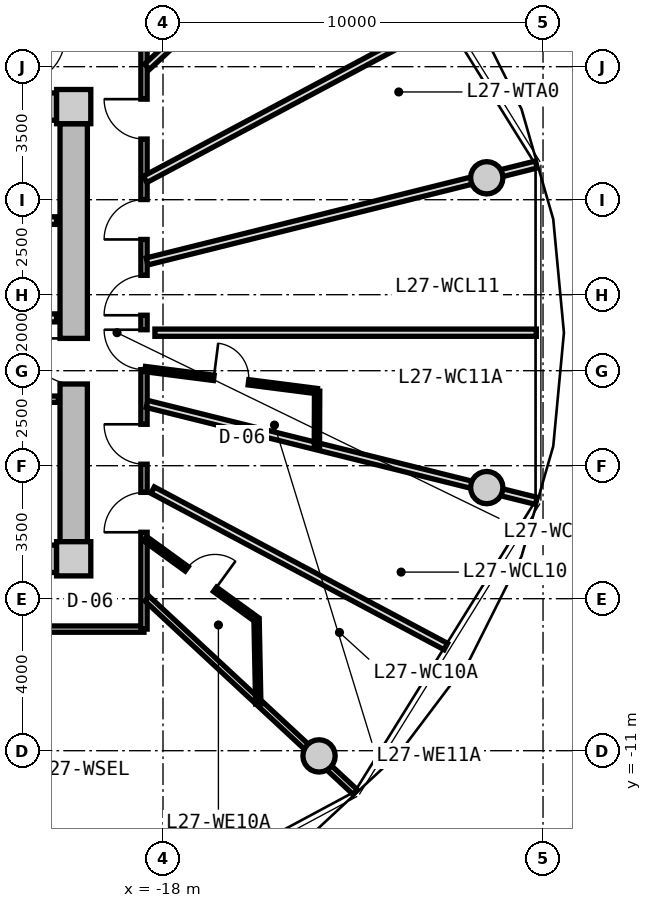
"""IFC4 building model, lengths in metres.
Left out: names, types, materials, properties, quantities, classifications, styles, units other than length and angle.
Written with IfcOpenShell. Run it as: python <this file> out.ifc"""

import sys

from ifc_helpers import new_model, si_unit, direction, frame, frame_2d, origin, origin_2d, place, context, subcontext, project, spatial, rectangle, circle, extrude, source, transform, mapped, element, fill, save


model = new_model("IFC4")
c1 = context("Model", 3, precision=1e-05, world=origin(), true_north=direction((0.0, 1.0)))
c2 = subcontext(c1, "Body", "Model", "MODEL_VIEW")
j1 = project(units=[si_unit("LENGTHUNIT", "METRE"), si_unit("PLANEANGLEUNIT", "RADIAN")], contexts=[c1])
p1 = place(None, origin())
s1 = spatial("IfcSite", under=j1, at=p1, CompositionType="ELEMENT")
p2 = place(p1, origin())
s2 = spatial("IfcBuilding", under=s1, at=p2, CompositionType="ELEMENT")
p3 = place(p2, frame((0.0, 0.0, 90.15)))
s3 = spatial("IfcBuildingStorey", under=s2, at=p3, CompositionType="ELEMENT", Elevation=90.15)
m1 = source(origin(), c2, "Body", "SweptSolid", [
    extrude(rectangle(XDim=0.9, YDim=0.9, at=origin_2d()), origin(), (0.0, 0.0, 1.0), 3.05),
])
for number, where, z_axis, x_axis in (
    (1, (-20.35, -5.95, 0.0), (0.0, 0.0, 1.0), (1.0, 0.0, 0.0)),
    (2, (-20.35, 5.95, 0.0), (0.0, 0.0, 1.0), (1.0, 0.0, 0.0)),
):
    element("IfcColumn", number, at=place(p3, frame(where, z_axis=z_axis, x_axis=x_axis)), inside=s3, PredefinedType="COLUMN", context=c2, shape_type="MappedRepresentation", body=[
        mapped(m1, transform((0.0, 0.0, 0.0), x_axis=(1.0, 0.0, 0.0), y_axis=(0.0, 1.0, 0.0), z_axis=(0.0, 0.0, 1.0), scale=1.0)),
    ])
m2 = source(origin(), c2, "Body", "SweptSolid", [
    extrude(rectangle(XDim=14.4, YDim=0.72, at=frame_2d((7.2, 0.0))), origin(), (0.0, 0.0, 1.0), 2.79),
])
for number, where, z_axis, x_axis in (
    (3, (-35.2, 5.95, 0.0), (0.0, 0.0, 1.0), (1.0, 0.0, 0.0)),
    (4, (-20.8, -5.95, 0.0), (0.0, 0.0, 1.0), (-1.0, 0.0, 0.0)),
):
    element("IfcWall", number, at=place(p3, frame(where, z_axis=z_axis, x_axis=x_axis)), inside=s3, PredefinedType="SHEAR", context=c2, shape_type="MappedRepresentation", body=[
        mapped(m2, transform((0.0, 0.0, 0.0), x_axis=(1.0, 0.0, 0.0), y_axis=(0.0, 1.0, 0.0), z_axis=(0.0, 0.0, 1.0), scale=1.0)),
    ])
m3 = source(origin(), c2, "Body", "SweptSolid", [
    extrude(rectangle(XDim=11.0, YDim=0.72, at=frame_2d((5.5, 0.0))), origin(), (0.0, 0.0, 1.0), 2.79),
])
p4 = place(p3, frame((-20.35, 5.5, 0.0), z_axis=(0.0, 0.0, 1.0), x_axis=(0.0, -1.0, 0.0)))
e5 = element("IfcWall", 5, at=p4, inside=s3, PredefinedType="SHEAR", context=c2, shape_type="MappedRepresentation", body=[
    mapped(m3, transform((0.0, 0.0, 0.0), x_axis=(1.0, 0.0, 0.0), y_axis=(0.0, 1.0, 0.0), z_axis=(0.0, 0.0, 1.0), scale=1.0)),
])
p5 = place(p4, frame((5.65, 0.0, 0.0)))
e6 = element("IfcOpeningElement", 6, at=p5, cuts=e5, PredefinedType="OPENING", context=c2, shape_type="SweptSolid", body=[
    extrude(rectangle(XDim=1.2, YDim=2.15, at=frame_2d((0.6, 1.075))), frame((0.0, 0.37, 0.0), z_axis=(0.0, -1.0, 0.0), x_axis=(1.0, 0.0, 0.0)), (0.0, 0.0, 1.0), 0.74),
])
m4 = source(origin(), c2, "Body", "SweptSolid", [
    extrude(circle(Radius=0.425, at=origin_2d()), origin(), (0.0, 0.0, 1.0), 3.05),
])
for number, where, z_axis, x_axis in (
    (7, (-9.481, 4.076, 0.0), (0.0, 0.0, 1.0), (1.0, 0.0, 0.0)),
    (8, (-13.894, -11.137, 0.0), (0.0, 0.0, 1.0), (1.0, 0.0, 0.0)),
    (9, (-9.481, -4.076, 0.0), (0.0, 0.0, 1.0), (1.0, 0.0, 0.0)),
):
    element("IfcColumn", number, at=place(p3, frame(where, z_axis=z_axis, x_axis=x_axis)), inside=s3, PredefinedType="COLUMN", context=c2, shape_type="MappedRepresentation", body=[
        mapped(m4, transform((0.0, 0.0, 0.0), x_axis=(1.0, 0.0, 0.0), y_axis=(0.0, 1.0, 0.0), z_axis=(0.0, 0.0, 1.0), scale=1.0)),
    ])
m5 = source(origin(), c2, "Body", "SweptSolid", [
    extrude(rectangle(XDim=3.2, YDim=0.2, at=frame_2d((1.6, 0.0))), origin(), (0.0, 0.0, 1.0), 2.775),
])
p6 = place(p3, frame((-24.0, 2.95, 0.0), z_axis=(0.0, 0.0, 1.0), x_axis=(1.0, 0.0, 0.0)))
e10 = element("IfcWall", 10, at=p6, inside=s3, PredefinedType="PARTITIONING", context=c2, shape_type="MappedRepresentation", body=[
    mapped(m5, transform((0.0, 0.0, 0.0), x_axis=(1.0, 0.0, 0.0), y_axis=(0.0, 1.0, 0.0), z_axis=(0.0, 0.0, 1.0), scale=1.0)),
])
m6 = source(origin(), c2, "Body", "SweptSolid", [
    extrude(rectangle(XDim=6.66, YDim=0.21, at=frame_2d((3.33, 0.0))), origin(), (0.0, 0.0, 1.0), 2.775),
])
p7 = place(p3, frame((-27.46, 0.39, 0.0), z_axis=(0.0, 0.0, 1.0), x_axis=(1.0, 0.0, 0.0)))
e11 = element("IfcWall", 11, at=p7, inside=s3, PredefinedType="PARTITIONING", context=c2, shape_type="MappedRepresentation", body=[
    mapped(m6, transform((0.0, 0.0, 0.0), x_axis=(1.0, 0.0, 0.0), y_axis=(0.0, 1.0, 0.0), z_axis=(0.0, 0.0, 1.0), scale=1.0)),
])
p8 = place(p7, frame((1.0, 0.0, 0.0)))
e12 = element("IfcOpeningElement", 12, at=p8, cuts=e11, PredefinedType="OPENING", context=c2, shape_type="SweptSolid", body=[
    extrude(rectangle(XDim=1.2, YDim=2.15, at=frame_2d((0.6, 1.075))), frame((0.0, 0.115, 0.0), z_axis=(0.0, -1.0, 0.0), x_axis=(1.0, 0.0, 0.0)), (0.0, 0.0, 1.0), 0.23),
])
m7 = source(origin(), c2, "Body", "SweptSolid", [
    extrude(rectangle(XDim=2.7, YDim=0.165, at=frame_2d((1.35, 0.0))), origin(), (0.0, 0.0, 1.0), 2.775),
])
p9 = place(p3, frame((-23.45, -1.75, 0.0), z_axis=(0.0, 0.0, 1.0), x_axis=(1.0, 0.0, 0.0)))
e13 = element("IfcWall", 13, at=p9, inside=s3, PredefinedType="PARTITIONING", context=c2, shape_type="MappedRepresentation", body=[
    mapped(m7, transform((0.0, 0.0, 0.0), x_axis=(1.0, 0.0, 0.0), y_axis=(0.0, 1.0, 0.0), z_axis=(0.0, 0.0, 1.0), scale=1.0)),
])
p10 = place(p9, frame((0.222, 0.0, 0.0)))
e14 = element("IfcOpeningElement", 14, at=p10, cuts=e13, PredefinedType="OPENING", context=c2, shape_type="SweptSolid", body=[
    extrude(rectangle(XDim=0.925, YDim=2.1, at=frame_2d((0.462, 1.05))), frame((0.0, 0.093, 0.0), z_axis=(0.0, -1.0, 0.0), x_axis=(1.0, 0.0, 0.0)), (0.0, 0.0, 1.0), 0.185),
])
p11 = place(p9, frame((1.522, 0.0, 0.0)))
e15 = element("IfcOpeningElement", 15, at=p11, cuts=e13, PredefinedType="OPENING", context=c2, shape_type="SweptSolid", body=[
    extrude(rectangle(XDim=0.925, YDim=2.1, at=frame_2d((0.462, 1.05))), frame((0.0, 0.093, 0.0), z_axis=(0.0, -1.0, 0.0), x_axis=(1.0, 0.0, 0.0)), (0.0, 0.0, 1.0), 0.185),
])
m8 = source(origin(), c2, "Body", "SweptSolid", [
    extrude(rectangle(XDim=8.6, YDim=0.165, at=frame_2d((4.3, 0.0))), origin(), (0.0, 0.0, 1.0), 2.775),
])
p12 = place(p3, frame((-18.5, -7.8, 0.0), z_axis=(0.0, 0.0, 1.0), x_axis=(-1.0, 0.0, 0.0)))
e16 = element("IfcWall", 16, at=p12, inside=s3, PredefinedType="PARTITIONING", context=c2, shape_type="MappedRepresentation", body=[
    mapped(m8, transform((0.0, 0.0, 0.0), x_axis=(1.0, 0.0, 0.0), y_axis=(0.0, 1.0, 0.0), z_axis=(0.0, 0.0, 1.0), scale=1.0)),
])
p13 = place(p12, frame((3.775, 0.0, 0.0)))
e17 = element("IfcOpeningElement", 17, at=p13, cuts=e16, PredefinedType="OPENING", context=c2, shape_type="SweptSolid", body=[
    extrude(rectangle(XDim=1.05, YDim=2.15, at=frame_2d((0.525, 1.075))), frame((0.0, 0.093, 0.0), z_axis=(0.0, -1.0, 0.0), x_axis=(1.0, 0.0, 0.0)), (0.0, 0.0, 1.0), 0.185),
])
m9 = source(origin(), c2, "Body", "SweptSolid", [
    extrude(rectangle(XDim=15.6, YDim=0.165, at=frame_2d((7.8, 0.0))), origin(), (0.0, 0.0, 1.0), 2.775),
])
p14 = place(p3, frame((-18.5, 7.8, 0.0), z_axis=(0.0, 0.0, 1.0), x_axis=(0.0, -1.0, 0.0)))
e18 = element("IfcWall", 18, at=p14, inside=s3, PredefinedType="PARTITIONING", context=c2, shape_type="MappedRepresentation", body=[
    mapped(m9, transform((0.0, 0.0, 0.0), x_axis=(1.0, 0.0, 0.0), y_axis=(0.0, 1.0, 0.0), z_axis=(0.0, 0.0, 1.0), scale=1.0)),
])
p15 = place(p14, frame((12.002, 0.0, 0.0)))
e19 = element("IfcOpeningElement", 19, at=p15, cuts=e18, PredefinedType="OPENING", context=c2, shape_type="SweptSolid", body=[
    extrude(rectangle(XDim=1.05, YDim=2.15, at=frame_2d((0.525, 1.075))), frame((0.0, 0.093, 0.0), z_axis=(0.0, -1.0, 0.0), x_axis=(1.0, 0.0, 0.0)), (0.0, 0.0, 1.0), 0.185),
])
p16 = place(p14, frame((10.211, 0.0, 0.0)))
e20 = element("IfcOpeningElement", 20, at=p16, cuts=e18, PredefinedType="OPENING", context=c2, shape_type="SweptSolid", body=[
    extrude(rectangle(XDim=1.05, YDim=2.15, at=frame_2d((0.525, 1.075))), frame((0.0, 0.093, 0.0), z_axis=(0.0, -1.0, 0.0), x_axis=(1.0, 0.0, 0.0)), (0.0, 0.0, 1.0), 0.185),
])
p17 = place(p14, frame((7.722, 0.0, 0.0)))
e21 = element("IfcOpeningElement", 21, at=p17, cuts=e18, PredefinedType="OPENING", context=c2, shape_type="SweptSolid", body=[
    extrude(rectangle(XDim=1.05, YDim=2.15, at=frame_2d((0.525, 1.075))), frame((0.0, 0.093, 0.0), z_axis=(0.0, -1.0, 0.0), x_axis=(1.0, 0.0, 0.0)), (0.0, 0.0, 1.0), 0.185),
])
p18 = place(p14, frame((6.291, 0.0, 0.0)))
e22 = element("IfcOpeningElement", 22, at=p18, cuts=e18, PredefinedType="OPENING", context=c2, shape_type="SweptSolid", body=[
    extrude(rectangle(XDim=1.05, YDim=2.15, at=frame_2d((0.525, 1.075))), frame((0.0, 0.093, 0.0), z_axis=(0.0, -1.0, 0.0), x_axis=(1.0, 0.0, 0.0)), (0.0, 0.0, 1.0), 0.185),
])
p19 = place(p14, frame((4.296, 0.0, 0.0)))
e23 = element("IfcOpeningElement", 23, at=p19, cuts=e18, PredefinedType="OPENING", context=c2, shape_type="SweptSolid", body=[
    extrude(rectangle(XDim=1.05, YDim=2.15, at=frame_2d((0.525, 1.075))), frame((0.0, 0.093, 0.0), z_axis=(0.0, -1.0, 0.0), x_axis=(1.0, 0.0, 0.0)), (0.0, 0.0, 1.0), 0.185),
])
p20 = place(p14, frame((1.654, 0.0, 0.0)))
e24 = element("IfcOpeningElement", 24, at=p20, cuts=e18, PredefinedType="OPENING", context=c2, shape_type="SweptSolid", body=[
    extrude(rectangle(XDim=1.05, YDim=2.15, at=frame_2d((0.525, 1.075))), frame((0.0, 0.093, 0.0), z_axis=(0.0, -1.0, 0.0), x_axis=(1.0, 0.0, 0.0)), (0.0, 0.0, 1.0), 0.185),
])
m10 = source(origin(), c2, "Body", "SweptSolid", [
    extrude(rectangle(XDim=7.482, YDim=0.165, at=frame_2d((3.741, 0.0))), origin(), (0.0, 0.0, 1.0), 2.275),
])
p21 = place(p3, frame((-18.42, -6.998, 0.0), z_axis=(0.0, 0.0, 1.0), x_axis=(0.732508698043, -0.680757671489, 0.0)))
e25 = element("IfcWall", 25, at=p21, inside=s3, PredefinedType="PARTITIONING", context=c2, shape_type="MappedRepresentation", body=[
    mapped(m10, transform((0.0, 0.0, 0.0), x_axis=(1.0, 0.0, 0.0), y_axis=(0.0, 1.0, 0.0), z_axis=(0.0, 0.0, 1.0), scale=1.0)),
])
m11 = source(origin(), c2, "Body", "SweptSolid", [
    extrude(rectangle(XDim=10.556, YDim=0.19, at=frame_2d((5.278, 0.0))), origin(), (0.0, 0.0, 1.0), 2.275),
])
p22 = place(p3, frame((-18.42, -1.875, 0.0), z_axis=(0.0, 0.0, 1.0), x_axis=(0.970363857851, -0.241648470667, 0.0)))
e26 = element("IfcWall", 26, at=p22, inside=s3, PredefinedType="PARTITIONING", context=c2, shape_type="MappedRepresentation", body=[
    mapped(m11, transform((0.0, 0.0, 0.0), x_axis=(1.0, 0.0, 0.0), y_axis=(0.0, 1.0, 0.0), z_axis=(0.0, 0.0, 1.0), scale=1.0)),
])
m12 = source(origin(), c2, "Body", "SweptSolid", [
    extrude(rectangle(XDim=8.744, YDim=0.19, at=frame_2d((4.372, 0.0))), origin(), (0.0, 0.0, 1.0), 2.775),
])
p23 = place(p3, frame((-18.273, -4.142, 0.0), z_axis=(0.0, 0.0, 1.0), x_axis=(0.882252449936, -0.470776607938, 0.0)))
e27 = element("IfcWall", 27, at=p23, inside=s3, PredefinedType="PARTITIONING", context=c2, shape_type="MappedRepresentation", body=[
    mapped(m12, transform((0.0, 0.0, 0.0), x_axis=(1.0, 0.0, 0.0), y_axis=(0.0, 1.0, 0.0), z_axis=(0.0, 0.0, 1.0), scale=1.0)),
])
m13 = source(origin(), c2, "Body", "SweptSolid", [
    extrude(rectangle(XDim=3.621, YDim=0.14, at=frame_2d((1.811, 0.0))), origin(), (0.0, 0.0, 1.0), 2.775),
])
p24 = place(p3, frame((-18.47, -5.422, 0.0), z_axis=(0.0, 0.0, 1.0), x_axis=(0.80968252222, -0.586868139544, 0.0)))
e28 = element("IfcWall", 28, at=p24, inside=s3, PredefinedType="PARTITIONING", context=c2, shape_type="MappedRepresentation", body=[
    mapped(m13, transform((0.0, 0.0, 0.0), x_axis=(1.0, 0.0, 0.0), y_axis=(0.0, 1.0, 0.0), z_axis=(0.0, 0.0, 1.0), scale=1.0)),
])
p25 = place(p24, frame((1.351, 0.0, 0.0)))
e29 = element("IfcOpeningElement", 29, at=p25, cuts=e28, PredefinedType="OPENING", context=c2, shape_type="SweptSolid", body=[
    extrude(rectangle(XDim=0.92, YDim=2.1, at=frame_2d((0.46, 1.05))), frame((0.0, 0.08, 0.0), z_axis=(0.0, -1.0, 0.0), x_axis=(1.0, 0.0, 0.0)), (0.0, 0.0, 1.0), 0.16),
])
m14 = source(origin(), c2, "Body", "SweptSolid", [
    extrude(rectangle(XDim=2.225, YDim=0.14, at=frame_2d((1.112, 0.0))), origin(), (0.0, 0.0, 1.0), 2.775),
])
p26 = place(p3, frame((-15.538, -7.547, 0.0), z_axis=(0.0, 0.0, 1.0), x_axis=(0.019971869027, -0.999800542332, 0.0)))
e30 = element("IfcWall", 30, at=p26, inside=s3, PredefinedType="PARTITIONING", context=c2, shape_type="MappedRepresentation", body=[
    mapped(m14, transform((0.0, 0.0, 0.0), x_axis=(1.0, 0.0, 0.0), y_axis=(0.0, 1.0, 0.0), z_axis=(0.0, 0.0, 1.0), scale=1.0)),
])
p27 = place(p3, frame((-18.42, 1.875, 0.0), z_axis=(0.0, 0.0, 1.0), x_axis=(0.970363857851, 0.241648470667, 0.0)))
e31 = element("IfcWall", 31, at=p27, inside=s3, PredefinedType="PARTITIONING", context=c2, shape_type="MappedRepresentation", body=[
    mapped(m11, transform((0.0, 0.0, 0.0), x_axis=(1.0, 0.0, 0.0), y_axis=(0.0, 1.0, 0.0), z_axis=(0.0, 0.0, 1.0), scale=1.0)),
])
m15 = source(origin(), c2, "Body", "SweptSolid", [
    extrude(rectangle(XDim=10.036, YDim=0.19, at=frame_2d((5.018, 0.0))), origin(), (0.0, 0.0, 1.0), 2.775),
])
p28 = place(p3, frame((-18.213, 0.0, 0.0), z_axis=(0.0, 0.0, 1.0), x_axis=(1.0, 0.0, 0.0)))
e32 = element("IfcWall", 32, at=p28, inside=s3, PredefinedType="PARTITIONING", context=c2, shape_type="MappedRepresentation", body=[
    mapped(m15, transform((0.0, 0.0, 0.0), x_axis=(1.0, 0.0, 0.0), y_axis=(0.0, 1.0, 0.0), z_axis=(0.0, 0.0, 1.0), scale=1.0)),
])
m16 = source(origin(), c2, "Body", "SweptSolid", [
    extrude(rectangle(XDim=4.562, YDim=0.14, at=frame_2d((2.281, 0.0))), origin(), (0.0, 0.0, 1.0), 2.775),
])
p29 = place(p3, frame((-18.47, -0.958, 0.0), z_axis=(0.0, 0.0, 1.0), x_axis=(0.991904666356, -0.126984774129, 0.0)))
e33 = element("IfcWall", 33, at=p29, inside=s3, PredefinedType="PARTITIONING", context=c2, shape_type="MappedRepresentation", body=[
    mapped(m16, transform((0.0, 0.0, 0.0), x_axis=(1.0, 0.0, 0.0), y_axis=(0.0, 1.0, 0.0), z_axis=(0.0, 0.0, 1.0), scale=1.0)),
])
p30 = place(p29, frame((1.821, 0.0, 0.0)))
e34 = element("IfcOpeningElement", 34, at=p30, cuts=e33, PredefinedType="OPENING", context=c2, shape_type="SweptSolid", body=[
    extrude(rectangle(XDim=0.92, YDim=2.1, at=frame_2d((0.46, 1.05))), frame((0.0, 0.08, 0.0), z_axis=(0.0, -1.0, 0.0), x_axis=(1.0, 0.0, 0.0)), (0.0, 0.0, 1.0), 0.16),
])
m17 = source(origin(), c2, "Body", "SweptSolid", [
    extrude(rectangle(XDim=1.468, YDim=0.14, at=frame_2d((0.734, 0.0))), origin(), (0.0, 0.0, 1.0), 2.775),
])
p31 = place(p3, frame((-13.945, -1.537, 0.0), z_axis=(0.0, 0.0, 1.0), x_axis=(-0.00399198416, -0.999992031999, 0.0)))
e35 = element("IfcWall", 35, at=p31, inside=s3, PredefinedType="PARTITIONING", context=c2, shape_type="MappedRepresentation", body=[
    mapped(m17, transform((0.0, 0.0, 0.0), x_axis=(1.0, 0.0, 0.0), y_axis=(0.0, 1.0, 0.0), z_axis=(0.0, 0.0, 1.0), scale=1.0)),
])
m18 = source(origin(), c2, "Body", "SweptSolid", [
    extrude(rectangle(XDim=7.482, YDim=0.19, at=frame_2d((3.741, 0.0))), origin(), (0.0, 0.0, 1.0), 2.275),
])
p32 = place(p3, frame((-18.42, 6.998, 0.0), z_axis=(0.0, 0.0, 1.0), x_axis=(0.732508698043, 0.680757671489, 0.0)))
e36 = element("IfcWall", 36, at=p32, inside=s3, PredefinedType="PARTITIONING", context=c2, shape_type="MappedRepresentation", body=[
    mapped(m18, transform((0.0, 0.0, 0.0), x_axis=(1.0, 0.0, 0.0), y_axis=(0.0, 1.0, 0.0), z_axis=(0.0, 0.0, 1.0), scale=1.0)),
])
m19 = source(origin(), c2, "Body", "SweptSolid", [
    extrude(rectangle(XDim=8.968, YDim=0.19, at=frame_2d((4.484, 0.0))), origin(), (0.0, 0.0, 1.0), 2.775),
])
p33 = place(p3, frame((-18.47, 4.036, 0.0), z_axis=(0.0, 0.0, 1.0), x_axis=(0.882202936563, 0.47086938605, 0.0)))
e37 = element("IfcWall", 37, at=p33, inside=s3, PredefinedType="PARTITIONING", context=c2, shape_type="MappedRepresentation", body=[
    mapped(m19, transform((0.0, 0.0, 0.0), x_axis=(1.0, 0.0, 0.0), y_axis=(0.0, 1.0, 0.0), z_axis=(0.0, 0.0, 1.0), scale=1.0)),
])
m20 = source(origin(), c2, "Body", "SweptSolid", [
    extrude(rectangle(XDim=1.2, YDim=2.15, at=frame_2d((0.6, 1.075))), frame((0.0, 0.025, 0.0), z_axis=(0.0, -1.0, 0.0), x_axis=(1.0, 0.0, 0.0)), (0.0, 0.0, 1.0), 0.05),
])
p34 = place(p5, frame((1.2, 0.0, 0.0), z_axis=(0.0, 0.0, 1.0), x_axis=(-1.0, 0.0, 0.0)))
e38 = element("IfcDoor", 38, at=p34, inside=s3, OperationType="SINGLE_SWING_RIGHT", PredefinedType="DOOR", context=c2, shape_type="MappedRepresentation", body=[
    mapped(m20, transform((0.0, 0.0, 0.0), x_axis=(1.0, 0.0, 0.0), y_axis=(0.0, 1.0, 0.0), z_axis=(0.0, 0.0, 1.0), scale=1.0)),
])
fill(e6, e38)
m21 = source(origin(), c2, "Body", "SweptSolid", [
    extrude(rectangle(XDim=1.05, YDim=2.15, at=frame_2d((0.525, 1.075))), frame((0.0, 0.025, 0.0), z_axis=(0.0, -1.0, 0.0), x_axis=(1.0, 0.0, 0.0)), (0.0, 0.0, 1.0), 0.05),
])
p35 = place(p15, frame((1.05, 0.0, 0.0), z_axis=(0.0, 0.0, 1.0), x_axis=(-1.0, 0.0, 0.0)))
e39 = element("IfcDoor", 39, at=p35, inside=s3, OperationType="SINGLE_SWING_LEFT", PredefinedType="DOOR", context=c2, shape_type="MappedRepresentation", body=[
    mapped(m21, transform((0.0, 0.0, 0.0), x_axis=(1.0, 0.0, 0.0), y_axis=(0.0, 1.0, 0.0), z_axis=(0.0, 0.0, 1.0), scale=1.0)),
])
fill(e19, e39)
m22 = source(origin(), c2, "Body", "SweptSolid", [
    extrude(rectangle(XDim=0.92, YDim=2.1, at=frame_2d((0.46, 1.05))), frame((0.0, 0.025, 0.0), z_axis=(0.0, -1.0, 0.0), x_axis=(1.0, 0.0, 0.0)), (0.0, 0.0, 1.0), 0.05),
])
p36 = place(p25, origin())
e40 = element("IfcDoor", 40, at=p36, inside=s3, OperationType="SINGLE_SWING_RIGHT", PredefinedType="DOOR", context=c2, shape_type="MappedRepresentation", body=[
    mapped(m22, transform((0.0, 0.0, 0.0), x_axis=(1.0, 0.0, 0.0), y_axis=(0.0, 1.0, 0.0), z_axis=(0.0, 0.0, 1.0), scale=1.0)),
])
fill(e29, e40)
p37 = place(p16, frame((1.05, 0.0, 0.0), z_axis=(0.0, 0.0, 1.0), x_axis=(-1.0, 0.0, 0.0)))
e41 = element("IfcDoor", 41, at=p37, inside=s3, OperationType="SINGLE_SWING_RIGHT", PredefinedType="DOOR", context=c2, shape_type="MappedRepresentation", body=[
    mapped(m21, transform((0.0, 0.0, 0.0), x_axis=(1.0, 0.0, 0.0), y_axis=(0.0, 1.0, 0.0), z_axis=(0.0, 0.0, 1.0), scale=1.0)),
])
fill(e20, e41)
p38 = place(p17, frame((1.05, 0.0, 0.0), z_axis=(0.0, 0.0, 1.0), x_axis=(-1.0, 0.0, 0.0)))
e42 = element("IfcDoor", 42, at=p38, inside=s3, OperationType="SINGLE_SWING_RIGHT", PredefinedType="DOOR", context=c2, shape_type="MappedRepresentation", body=[
    mapped(m21, transform((0.0, 0.0, 0.0), x_axis=(1.0, 0.0, 0.0), y_axis=(0.0, 1.0, 0.0), z_axis=(0.0, 0.0, 1.0), scale=1.0)),
])
fill(e21, e42)
p39 = place(p30, origin())
e43 = element("IfcDoor", 43, at=p39, inside=s3, OperationType="SINGLE_SWING_LEFT", PredefinedType="DOOR", context=c2, shape_type="MappedRepresentation", body=[
    mapped(m22, transform((0.0, 0.0, 0.0), x_axis=(1.0, 0.0, 0.0), y_axis=(0.0, 1.0, 0.0), z_axis=(0.0, 0.0, 1.0), scale=1.0)),
])
fill(e34, e43)
p40 = place(p18, frame((1.05, 0.0, 0.0), z_axis=(0.0, 0.0, 1.0), x_axis=(-1.0, 0.0, 0.0)))
e44 = element("IfcDoor", 44, at=p40, inside=s3, OperationType="SINGLE_SWING_LEFT", PredefinedType="DOOR", context=c2, shape_type="MappedRepresentation", body=[
    mapped(m21, transform((0.0, 0.0, 0.0), x_axis=(1.0, 0.0, 0.0), y_axis=(0.0, 1.0, 0.0), z_axis=(0.0, 0.0, 1.0), scale=1.0)),
])
fill(e22, e44)
p41 = place(p19, frame((1.05, 0.0, 0.0), z_axis=(0.0, 0.0, 1.0), x_axis=(-1.0, 0.0, 0.0)))
e45 = element("IfcDoor", 45, at=p41, inside=s3, OperationType="SINGLE_SWING_LEFT", PredefinedType="DOOR", context=c2, shape_type="MappedRepresentation", body=[
    mapped(m21, transform((0.0, 0.0, 0.0), x_axis=(1.0, 0.0, 0.0), y_axis=(0.0, 1.0, 0.0), z_axis=(0.0, 0.0, 1.0), scale=1.0)),
])
fill(e23, e45)
p42 = place(p20, frame((1.05, 0.0, 0.0), z_axis=(0.0, 0.0, 1.0), x_axis=(-1.0, 0.0, 0.0)))
e46 = element("IfcDoor", 46, at=p42, inside=s3, OperationType="SINGLE_SWING_RIGHT", PredefinedType="DOOR", context=c2, shape_type="MappedRepresentation", body=[
    mapped(m21, transform((0.0, 0.0, 0.0), x_axis=(1.0, 0.0, 0.0), y_axis=(0.0, 1.0, 0.0), z_axis=(0.0, 0.0, 1.0), scale=1.0)),
])
fill(e24, e46)
save(model, sys.argv[1])
